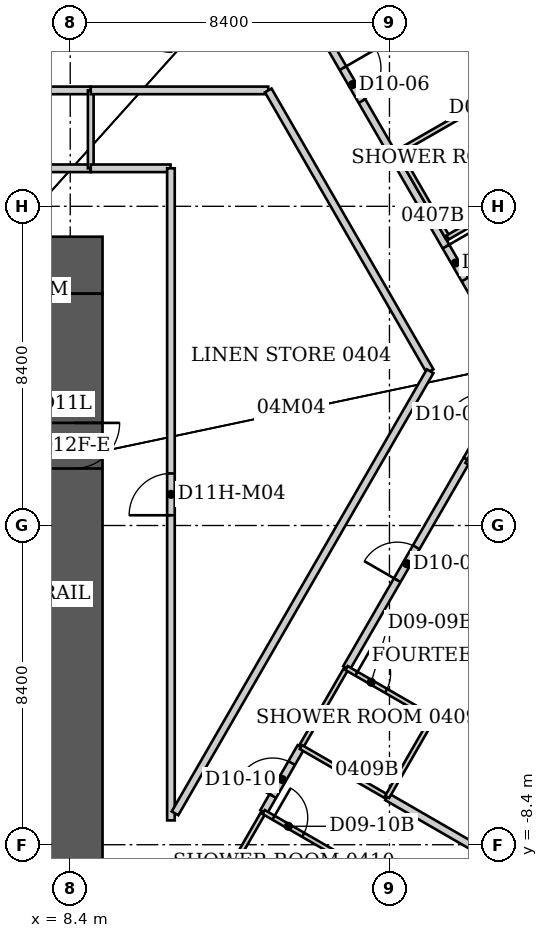
"""IFC4 building model, lengths in metres.
Left out: names, types, materials, properties, quantities, classifications, styles, units other than length and angle.
Written with IfcOpenShell. Run it as: python <this file> out.ifc"""

import sys

from ifc_helpers import new_model, si_unit, direction, frame, frame_2d, origin, place, context, subcontext, project, spatial, rectangle, extrude, element, fill, save


model = new_model("IFC4")
c1 = context("Model", 3, precision=1e-05, world=origin(), true_north=direction((0.0, 1.0)))
c2 = subcontext(c1, "Body", "Model", "MODEL_VIEW")
j1 = project(units=[si_unit("LENGTHUNIT", "METRE"), si_unit("PLANEANGLEUNIT", "RADIAN")], contexts=[c1])
p1 = place(None, origin())
s1 = spatial("IfcSite", under=j1, at=p1, CompositionType="ELEMENT")
p2 = place(p1, origin())
s2 = spatial("IfcBuilding", under=s1, at=p2, CompositionType="ELEMENT")
p3 = place(p2, frame((0.0, 0.0, 23.0)))
s3 = spatial("IfcBuildingStorey", under=s2, at=p3, CompositionType="ELEMENT", Elevation=23.0)
p4 = place(p3, frame((-9.25, 6.85, 0.0), z_axis=(0.0, 0.0, 1.0), x_axis=(1.0, 0.0, 0.0)))
e1 = element("IfcWall", 1, at=p4, inside=s3, PredefinedType="SHEAR", context=c2, shape_type="SweptSolid", body=[
    extrude(rectangle(XDim=18.5, YDim=1.5, at=frame_2d((9.25, 0.0))), origin(), (0.0, 0.0, 1.0), 3.8),
])
p5 = place(p3, frame((8.5, -9.2, 0.0), z_axis=(0.0, 0.0, 1.0), x_axis=(0.0, 1.0, 0.0)))
e2 = element("IfcWall", 2, at=p5, inside=s3, PredefinedType="SHEAR", context=c2, shape_type="SweptSolid", body=[
    extrude(rectangle(XDim=15.3, YDim=1.5, at=frame_2d((7.65, 0.0))), origin(), (0.0, 0.0, 1.0), 3.8),
])
p6 = place(p5, frame((10.7, 0.0, 0.0)))
e3 = element("IfcOpeningElement", 3, at=p6, cuts=e2, PredefinedType="OPENING", context=c2, shape_type="SweptSolid", body=[
    extrude(rectangle(XDim=1.2, YDim=2.2, at=frame_2d((0.6, 1.1))), frame((0.0, 0.75, 0.0), z_axis=(0.0, -1.0, 0.0), x_axis=(1.0, 0.0, 0.0)), (0.0, 0.0, 1.0), 1.5),
])
p7 = place(p3, frame((0.0, 11.45, 0.0), z_axis=(0.0, 0.0, 1.0), x_axis=(1.0, 0.0, 0.0)))
e4 = element("IfcWall", 4, at=p7, inside=s3, PredefinedType="PARTITIONING", context=c2, shape_type="SweptSolid", body=[
    extrude(rectangle(XDim=8.94, YDim=0.2, at=frame_2d((4.47, 0.0))), origin(), (0.0, 0.0, 1.0), 3.64),
])
p8 = place(p7, frame((3.92, 0.0, 0.0)))
e5 = element("IfcOpeningElement", 5, at=p8, cuts=e4, PredefinedType="OPENING", context=c2, shape_type="SweptSolid", body=[
    extrude(rectangle(XDim=1.1, YDim=2.2, at=frame_2d((0.55, 1.1))), frame((0.0, 0.1, 0.0), z_axis=(0.0, -1.0, 0.0), x_axis=(1.0, 0.0, 0.0)), (0.0, 0.0, 1.0), 0.2),
])
p9 = place(p3, frame((8.94, 9.4, 0.0), z_axis=(0.0, 0.0, 1.0), x_axis=(-1.0, 0.0, 0.0)))
e6 = element("IfcWall", 6, at=p9, inside=s3, PredefinedType="PARTITIONING", context=c2, shape_type="SweptSolid", body=[
    extrude(rectangle(XDim=8.94, YDim=0.2, at=frame_2d((4.47, 0.0))), origin(), (0.0, 0.0, 1.0), 3.64),
])
p10 = place(p3, frame((8.94, 11.45, 0.0), z_axis=(0.0, 0.0, 1.0), x_axis=(0.0, -1.0, 0.0)))
e7 = element("IfcWall", 7, at=p10, inside=s3, PredefinedType="PARTITIONING", context=c2, shape_type="SweptSolid", body=[
    extrude(rectangle(XDim=2.05, YDim=0.15, at=frame_2d((1.025, 0.0))), origin(), (0.0, 0.0, 1.0), 3.64),
])
p11 = place(p3, frame((8.94, 11.45, 0.0), z_axis=(0.0, 0.0, 1.0), x_axis=(1.0, 0.0, 0.0)))
e8 = element("IfcWall", 8, at=p11, inside=s3, PredefinedType="PARTITIONING", context=c2, shape_type="SweptSolid", body=[
    extrude(rectangle(XDim=4.67, YDim=0.2, at=frame_2d((2.335, 0.0))), origin(), (0.0, 0.0, 1.0), 3.64),
])
p12 = place(p3, frame((11.04, 9.4, 0.0), z_axis=(0.0, 0.0, 1.0), x_axis=(-1.0, 0.0, 0.0)))
e9 = element("IfcWall", 9, at=p12, inside=s3, PredefinedType="PARTITIONING", context=c2, shape_type="SweptSolid", body=[
    extrude(rectangle(XDim=2.1, YDim=0.2, at=frame_2d((1.05, 0.0))), origin(), (0.0, 0.0, 1.0), 3.64),
])
p13 = place(p3, frame((11.05, -7.76, 0.0), z_axis=(0.0, 0.0, 1.0), x_axis=(0.0, 1.0, 0.0)))
e10 = element("IfcWall", 10, at=p13, inside=s3, PredefinedType="PARTITIONING", context=c2, shape_type="SweptSolid", body=[
    extrude(rectangle(XDim=17.16, YDim=0.2, at=frame_2d((8.58, 0.0))), origin(), (0.0, 0.0, 1.0), 3.64),
])
p14 = place(p13, frame((8.03, 0.0, 0.0)))
e11 = element("IfcOpeningElement", 11, at=p14, cuts=e10, PredefinedType="OPENING", context=c2, shape_type="SweptSolid", body=[
    extrude(rectangle(XDim=1.1, YDim=2.2, at=frame_2d((0.55, 1.1))), frame((0.0, 0.1, 0.0), z_axis=(0.0, -1.0, 0.0), x_axis=(1.0, 0.0, 0.0)), (0.0, 0.0, 1.0), 0.2),
])
p15 = place(p3, frame((12.29, -9.62, 0.0), z_axis=(0.0, 0.0, 1.0), x_axis=(0.499693115345, 0.866202511239, 0.0)))
e12 = element("IfcWall", 12, at=p15, inside=s3, PredefinedType="PARTITIONING", context=c2, shape_type="SweptSolid", body=[
    extrude(rectangle(XDim=2.401, YDim=0.12, at=frame_2d((1.201, 0.0))), origin(), (0.0, 0.0, 1.0), 3.64),
])
p16 = place(p3, frame((13.489, -7.539, 0.0), z_axis=(0.0, 0.0, 1.0), x_axis=(0.4978588916, 0.867258049288, 0.0)))
e13 = element("IfcWall", 13, at=p16, inside=s3, PredefinedType="PARTITIONING", context=c2, shape_type="SweptSolid", body=[
    extrude(rectangle(XDim=1.971, YDim=0.2, at=frame_2d((0.985, 0.0))), origin(), (0.0, 0.0, 1.0), 3.64),
])
p17 = place(p16, frame((0.486, 0.0, 0.0)))
e14 = element("IfcOpeningElement", 14, at=p17, cuts=e13, PredefinedType="OPENING", context=c2, shape_type="SweptSolid", body=[
    extrude(rectangle(XDim=1.0, YDim=2.13, at=frame_2d((0.5, 1.065))), frame((0.0, 0.1, 0.0), z_axis=(0.0, -1.0, 0.0), x_axis=(1.0, 0.0, 0.0)), (0.0, 0.0, 1.0), 0.2),
])
p18 = place(p3, frame((13.61, 11.45, 0.0), z_axis=(0.0, 0.0, 1.0), x_axis=(0.499402776741, -0.866369936334, 0.0)))
e15 = element("IfcWall", 15, at=p18, inside=s3, PredefinedType="PARTITIONING", context=c2, shape_type="SweptSolid", body=[
    extrude(rectangle(XDim=8.53, YDim=0.2, at=frame_2d((4.265, 0.0))), origin(), (0.0, 0.0, 1.0), 3.64),
])
p19 = place(p3, frame((14.47, -5.83, 0.0), z_axis=(0.0, 0.0, 1.0), x_axis=(0.499693115345, 0.866202511239, 0.0)))
e16 = element("IfcWall", 16, at=p19, inside=s3, PredefinedType="PARTITIONING", context=c2, shape_type="SweptSolid", body=[
    extrude(rectangle(XDim=2.401, YDim=0.12, at=frame_2d((1.201, 0.0))), origin(), (0.0, 0.0, 1.0), 3.64),
])
p20 = place(p3, frame((14.47, -5.83, 0.0), z_axis=(0.0, 0.0, 1.0), x_axis=(0.866010296064, -0.500026166427, 0.0)))
e17 = element("IfcWall", 17, at=p20, inside=s3, PredefinedType="PARTITIONING", context=c2, shape_type="SweptSolid", body=[
    extrude(rectangle(XDim=2.621, YDim=0.12, at=frame_2d((1.311, 0.0))), origin(), (0.0, 0.0, 1.0), 3.023),
])
p21 = place(p3, frame((14.76, 13.45, 0.0), z_axis=(0.0, 0.0, 1.0), x_axis=(0.499894213467, -0.866086471054, 0.0)))
e18 = element("IfcWall", 18, at=p21, inside=s3, PredefinedType="PARTITIONING", context=c2, shape_type="SweptSolid", body=[
    extrude(rectangle(XDim=4.266, YDim=0.2, at=frame_2d((2.133, 0.0))), origin(), (0.0, 0.0, 1.0), 3.64),
])
p22 = place(p21, frame((1.633, 0.0, 0.0)))
e19 = element("IfcOpeningElement", 19, at=p22, cuts=e18, PredefinedType="OPENING", context=c2, shape_type="SweptSolid", body=[
    extrude(rectangle(XDim=1.0, YDim=2.13, at=frame_2d((0.5, 1.065))), frame((0.0, 0.1, 0.0), z_axis=(0.0, -1.0, 0.0), x_axis=(1.0, 0.0, 0.0)), (0.0, 0.0, 1.0), 0.2),
])
p23 = place(p3, frame((15.67, -3.75, 0.0), z_axis=(0.0, 0.0, 1.0), x_axis=(0.500061360627, 0.865989974311, 0.0)))
e20 = element("IfcWall", 20, at=p23, inside=s3, PredefinedType="PARTITIONING", context=c2, shape_type="SweptSolid", body=[
    extrude(rectangle(XDim=6.34, YDim=0.2, at=frame_2d((3.17, 0.0))), origin(), (0.0, 0.0, 1.0), 3.64),
])
p24 = place(p23, frame((2.67, 0.0, 0.0)))
e21 = element("IfcOpeningElement", 21, at=p24, cuts=e20, PredefinedType="OPENING", context=c2, shape_type="SweptSolid", body=[
    extrude(rectangle(XDim=1.0, YDim=2.13, at=frame_2d((0.5, 1.065))), frame((0.0, 0.1, 0.0), z_axis=(0.0, -1.0, 0.0), x_axis=(1.0, 0.0, 0.0)), (0.0, 0.0, 1.0), 0.2),
])
p25 = place(p3, frame((15.76, -8.85, 0.0), z_axis=(0.0, 0.0, 1.0), x_axis=(-0.866114241029, 0.499846097802, 0.0)))
e22 = element("IfcWall", 22, at=p25, inside=s3, PredefinedType="PARTITIONING", context=c2, shape_type="SweptSolid", body=[
    extrude(rectangle(XDim=2.621, YDim=0.12, at=frame_2d((1.311, 0.0))), origin(), (0.0, 0.0, 1.0), 3.64),
])
p26 = place(p25, frame((1.421, 0.0, 0.0)))
e23 = element("IfcOpeningElement", 23, at=p26, cuts=e22, PredefinedType="OPENING", context=c2, shape_type="SweptSolid", body=[
    extrude(rectangle(XDim=0.9, YDim=2.03, at=frame_2d((0.45, 1.015))), frame((0.0, 0.06, 0.0), z_axis=(0.0, -1.0, 0.0), x_axis=(1.0, 0.0, 0.0)), (0.0, 0.0, 1.0), 0.12),
])
p27 = place(p3, frame((16.74, -7.141, 0.0), z_axis=(0.0, 0.0, 1.0), x_axis=(0.865985044037, -0.500069898618, 0.0)))
e24 = element("IfcWall", 24, at=p27, inside=s3, PredefinedType="PARTITIONING", context=c2, shape_type="SweptSolid", body=[
    extrude(rectangle(XDim=5.758, YDim=0.2, at=frame_2d((2.879, 0.0))), origin(), (0.0, 0.0, 1.0), 3.023),
])
p28 = place(p3, frame((16.74, -7.14, 0.0), z_axis=(0.0, 0.0, 1.0), x_axis=(0.499737123639, 0.866177122335, 0.0)))
e25 = element("IfcWall", 25, at=p28, inside=s3, PredefinedType="PARTITIONING", context=c2, shape_type="SweptSolid", body=[
    extrude(rectangle(XDim=2.401, YDim=0.12, at=frame_2d((1.201, 0.0))), origin(), (0.0, 0.0, 1.0), 3.64),
])
p29 = place(p3, frame((16.892, 9.756, 0.0), z_axis=(0.0, 0.0, 1.0), x_axis=(0.499916344562, -0.866073696887, 0.0)))
e26 = element("IfcWall", 26, at=p29, inside=s3, PredefinedType="PARTITIONING", context=c2, shape_type="SweptSolid", body=[
    extrude(rectangle(XDim=6.576, YDim=0.2, at=frame_2d((3.288, 0.0))), origin(), (0.0, 0.0, 1.0), 3.64),
])
p30 = place(p29, frame((2.788, 0.0, 0.0)))
e27 = element("IfcOpeningElement", 27, at=p30, cuts=e26, PredefinedType="OPENING", context=c2, shape_type="SweptSolid", body=[
    extrude(rectangle(XDim=1.0, YDim=2.13, at=frame_2d((0.5, 1.065))), frame((0.0, 0.1, 0.0), z_axis=(0.0, -1.0, 0.0), x_axis=(1.0, 0.0, 0.0)), (0.0, 0.0, 1.0), 0.2),
])
p31 = place(p3, frame((16.904, 9.762, 0.0), z_axis=(0.0, 0.0, 1.0), x_axis=(0.875926787791, 0.482444051088, 0.0)))
e28 = element("IfcWall", 28, at=p31, inside=s3, PredefinedType="PARTITIONING", context=c2, shape_type="SweptSolid", body=[
    extrude(rectangle(XDim=0.143, YDim=0.2, at=frame_2d((0.071, 0.0))), origin(), (0.0, 0.0, 1.0), 3.64),
])
p32 = place(p3, frame((17.028, 9.834, 0.0), z_axis=(0.0, 0.0, 1.0), x_axis=(0.867064427496, 0.498196024242, 0.0)))
e29 = element("IfcWall", 29, at=p32, inside=s3, PredefinedType="PARTITIONING", context=c2, shape_type="SweptSolid", body=[
    extrude(rectangle(XDim=2.401, YDim=0.12, at=frame_2d((1.201, 0.0))), origin(), (0.0, 0.0, 1.0), 2.86),
])
p33 = place(p3, frame((17.03, 9.83, 0.0), z_axis=(0.0, 0.0, 1.0), x_axis=(0.500291685314, -0.865856933682, 0.0)))
e30 = element("IfcWall", 30, at=p33, inside=s3, PredefinedType="PARTITIONING", context=c2, shape_type="SweptSolid", body=[
    extrude(rectangle(XDim=2.599, YDim=0.12, at=frame_2d((1.299, 0.0))), origin(), (0.0, 0.0, 1.0), 3.64),
])
p34 = place(p3, frame((17.87, 4.06, 0.0), z_axis=(0.0, 0.0, 1.0), x_axis=(-0.499769659837, -0.866158349903, 0.0)))
e31 = element("IfcWall", 31, at=p34, inside=s3, PredefinedType="PARTITIONING", context=c2, shape_type="SweptSolid", body=[
    extrude(rectangle(XDim=13.431, YDim=0.2, at=frame_2d((6.716, 0.0))), origin(), (0.0, 0.0, 1.0), 3.64),
])
p35 = place(p3, frame((17.94, -5.06, 0.0), z_axis=(0.0, 0.0, 1.0), x_axis=(-0.866114241029, 0.499846097802, 0.0)))
e32 = element("IfcWall", 32, at=p35, inside=s3, PredefinedType="PARTITIONING", context=c2, shape_type="SweptSolid", body=[
    extrude(rectangle(XDim=2.621, YDim=0.12, at=frame_2d((1.311, 0.0))), origin(), (0.0, 0.0, 1.0), 3.64),
])
p36 = place(p35, frame((1.421, 0.0, 0.0)))
e33 = element("IfcOpeningElement", 33, at=p36, cuts=e32, PredefinedType="OPENING", context=c2, shape_type="SweptSolid", body=[
    extrude(rectangle(XDim=0.9, YDim=2.03, at=frame_2d((0.45, 1.015))), frame((0.0, 0.06, 0.0), z_axis=(0.0, -1.0, 0.0), x_axis=(1.0, 0.0, 0.0)), (0.0, 0.0, 1.0), 0.12),
])
p37 = place(p3, frame((18.33, 7.58, 0.0), z_axis=(0.0, 0.0, 1.0), x_axis=(0.866177122335, 0.499737123639, 0.0)))
e34 = element("IfcWall", 34, at=p37, inside=s3, PredefinedType="PARTITIONING", context=c2, shape_type="SweptSolid", body=[
    extrude(rectangle(XDim=2.401, YDim=0.12, at=frame_2d((1.201, 0.0))), origin(), (0.0, 0.0, 1.0), 3.64),
])
p38 = place(p3, frame((18.84, 1.74, 0.0), z_axis=(0.0, 0.0, 1.0), x_axis=(0.500098439427, 0.865968562295, 0.0)))
e35 = element("IfcWall", 35, at=p38, inside=s3, PredefinedType="PARTITIONING", context=c2, shape_type="SweptSolid", body=[
    extrude(rectangle(XDim=2.679, YDim=0.2, at=frame_2d((1.34, 0.0))), origin(), (0.0, 0.0, 1.0), 3.64),
])
p39 = place(p38, frame((0.84, 0.0, 0.0)))
e36 = element("IfcOpeningElement", 36, at=p39, cuts=e35, PredefinedType="OPENING", context=c2, shape_type="SweptSolid", body=[
    extrude(rectangle(XDim=1.0, YDim=2.13, at=frame_2d((0.5, 1.065))), frame((0.0, 0.1, 0.0), z_axis=(0.0, -1.0, 0.0), x_axis=(1.0, 0.0, 0.0)), (0.0, 0.0, 1.0), 0.2),
])
p40 = place(p3, frame((26.096, -2.45, 0.0), z_axis=(0.0, 0.0, 1.0), x_axis=(-0.866002919298, 0.500038942252, 0.0)))
e37 = element("IfcWall", 37, at=p40, inside=s3, PredefinedType="PARTITIONING", context=c2, shape_type="SweptSolid", body=[
    extrude(rectangle(XDim=8.369, YDim=0.2, at=frame_2d((4.185, 0.0))), origin(), (0.0, 0.0, 1.0), 3.64),
])
p41 = place(p22, origin())
e38 = element("IfcDoor", 38, at=p41, inside=s3, OperationType="SINGLE_SWING_LEFT", PredefinedType="DOOR", context=c2, shape_type="SweptSolid", body=[
    extrude(rectangle(XDim=1.0, YDim=2.13, at=frame_2d((0.5, 1.065))), frame((0.0, 0.025, 0.0), z_axis=(0.0, -1.0, 0.0), x_axis=(1.0, 0.0, 0.0)), (0.0, 0.0, 1.0), 0.05),
])
fill(e19, e38)
p42 = place(p30, origin())
e39 = element("IfcDoor", 39, at=p42, inside=s3, OperationType="SINGLE_SWING_LEFT", PredefinedType="DOOR", context=c2, shape_type="SweptSolid", body=[
    extrude(rectangle(XDim=1.0, YDim=2.13, at=frame_2d((0.5, 1.065))), frame((0.0, 0.025, 0.0), z_axis=(0.0, -1.0, 0.0), x_axis=(1.0, 0.0, 0.0)), (0.0, 0.0, 1.0), 0.05),
])
fill(e27, e39)
p43 = place(p24, origin())
e40 = element("IfcDoor", 40, at=p43, inside=s3, OperationType="SINGLE_SWING_LEFT", PredefinedType="DOOR", context=c2, shape_type="SweptSolid", body=[
    extrude(rectangle(XDim=1.0, YDim=2.13, at=frame_2d((0.5, 1.065))), frame((0.0, 0.025, 0.0), z_axis=(0.0, -1.0, 0.0), x_axis=(1.0, 0.0, 0.0)), (0.0, 0.0, 1.0), 0.05),
])
fill(e21, e40)
p44 = place(p36, origin())
e41 = element("IfcDoor", 41, at=p44, inside=s3, OperationType="SINGLE_SWING_RIGHT", PredefinedType="DOOR", context=c2, shape_type="SweptSolid", body=[
    extrude(rectangle(XDim=0.9, YDim=2.03, at=frame_2d((0.45, 1.015))), frame((0.0, 0.025, 0.0), z_axis=(0.0, -1.0, 0.0), x_axis=(1.0, 0.0, 0.0)), (0.0, 0.0, 1.0), 0.05),
])
fill(e33, e41)
p45 = place(p17, origin())
e42 = element("IfcDoor", 42, at=p45, inside=s3, OperationType="SINGLE_SWING_LEFT", PredefinedType="DOOR", context=c2, shape_type="SweptSolid", body=[
    extrude(rectangle(XDim=1.0, YDim=2.13, at=frame_2d((0.5, 1.065))), frame((0.0, 0.025, 0.0), z_axis=(0.0, -1.0, 0.0), x_axis=(1.0, 0.0, 0.0)), (0.0, 0.0, 1.0), 0.05),
])
fill(e14, e42)
p46 = place(p26, origin())
e43 = element("IfcDoor", 43, at=p46, inside=s3, OperationType="SINGLE_SWING_RIGHT", PredefinedType="DOOR", context=c2, shape_type="SweptSolid", body=[
    extrude(rectangle(XDim=0.9, YDim=2.03, at=frame_2d((0.45, 1.015))), frame((0.0, 0.025, 0.0), z_axis=(0.0, -1.0, 0.0), x_axis=(1.0, 0.0, 0.0)), (0.0, 0.0, 1.0), 0.05),
])
fill(e23, e43)
p47 = place(p14, origin())
e44 = element("IfcDoor", 44, at=p47, inside=s3, OperationType="SINGLE_SWING_LEFT", PredefinedType="DOOR", context=c2, shape_type="SweptSolid", body=[
    extrude(rectangle(XDim=1.1, YDim=2.2, at=frame_2d((0.55, 1.1))), frame((0.0, 0.025, 0.0), z_axis=(0.0, -1.0, 0.0), x_axis=(1.0, 0.0, 0.0)), (0.0, 0.0, 1.0), 0.05),
])
fill(e11, e44)
p48 = place(p6, origin())
e45 = element("IfcDoor", 45, at=p48, inside=s3, OperationType="SINGLE_SWING_RIGHT", PredefinedType="DOOR", context=c2, shape_type="SweptSolid", body=[
    extrude(rectangle(XDim=1.2, YDim=2.2, at=frame_2d((0.6, 1.1))), frame((0.0, 0.025, 0.0), z_axis=(0.0, -1.0, 0.0), x_axis=(1.0, 0.0, 0.0)), (0.0, 0.0, 1.0), 0.05),
])
fill(e3, e45)
save(model, sys.argv[1])
